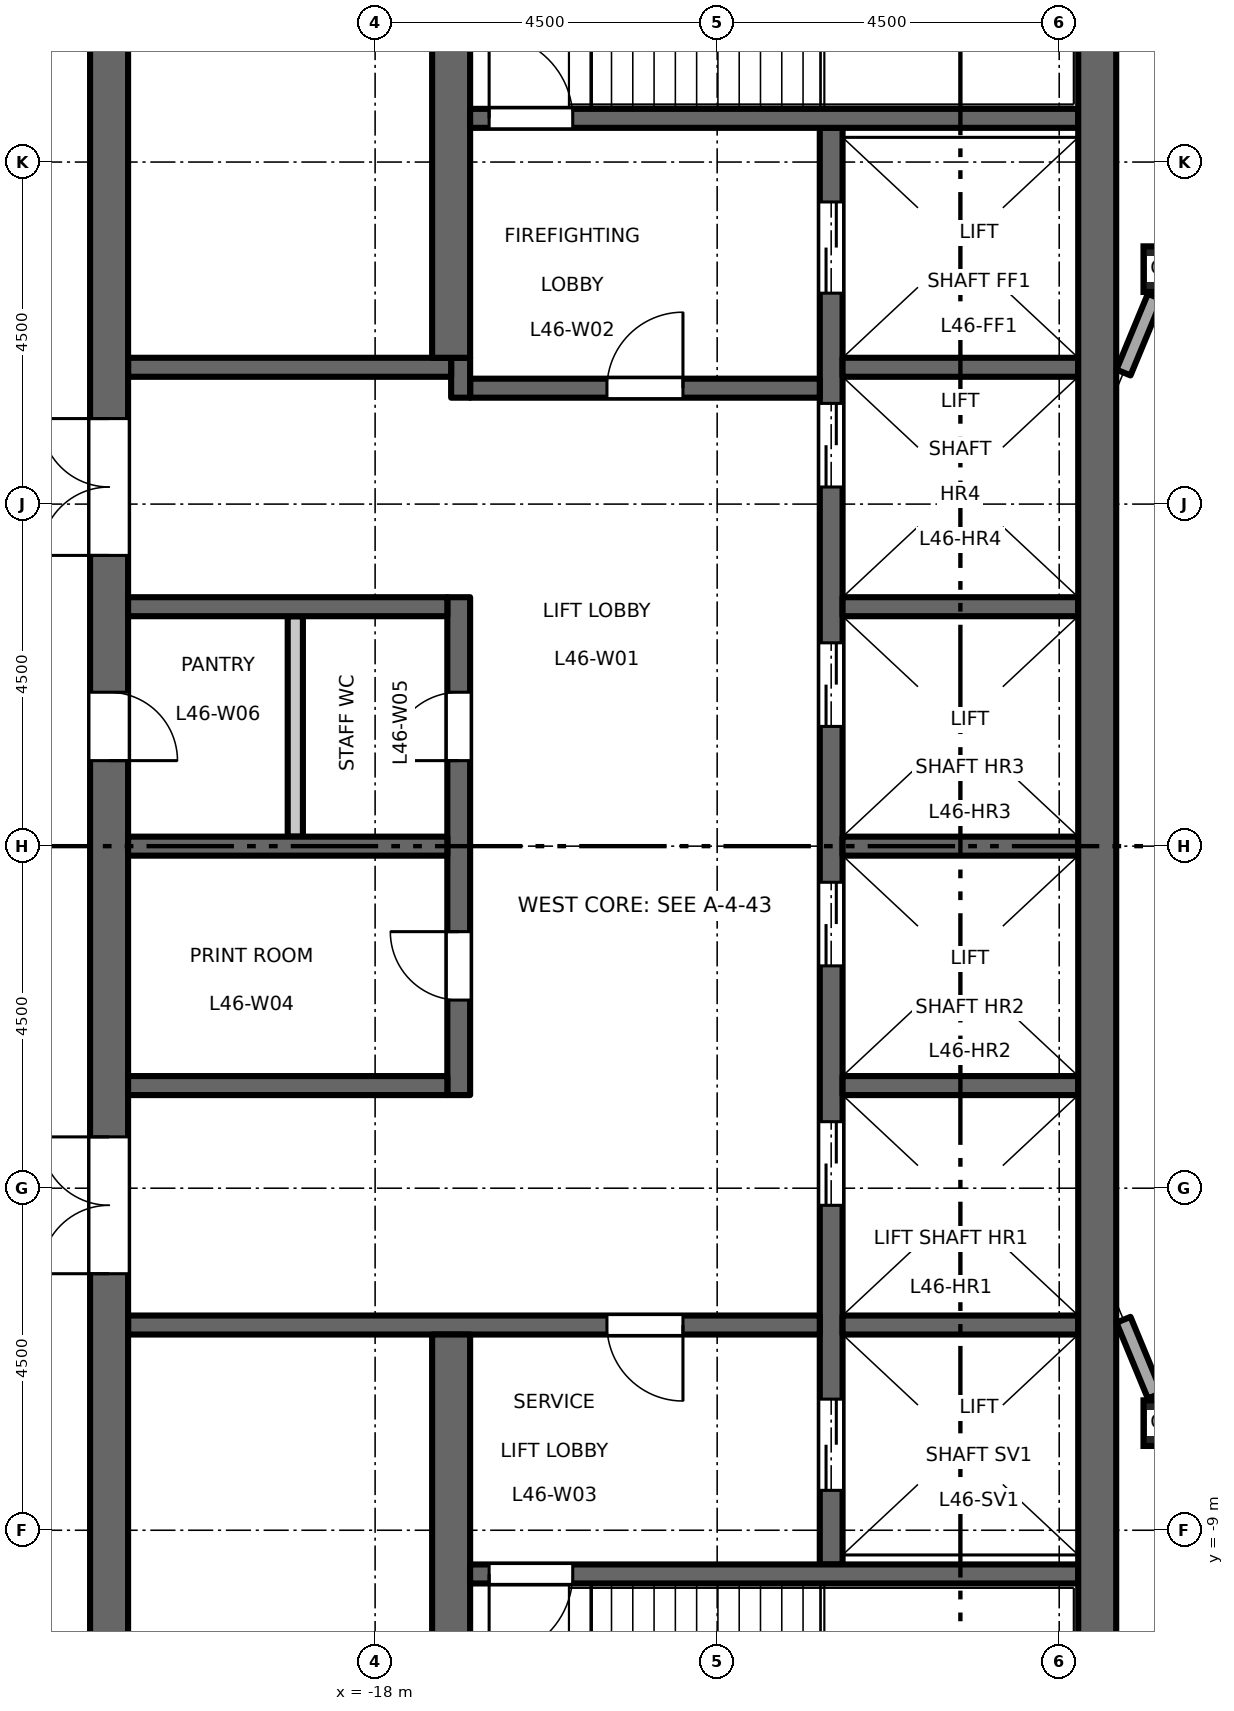
"""IFC4 building model, lengths in metres.
Left out: names, types, materials, properties, quantities, classifications, styles, units other than length and angle.
Written with IfcOpenShell. Run it as: python <this file> out.ifc"""

import sys

from ifc_helpers import new_model, si_unit, direction, frame, frame_2d, origin, origin_2d, place, context, subcontext, project, spatial, rectangle, hollow_rectangle, extrude, element, fill, save


model = new_model("IFC4")
c1 = context("Model", 3, precision=1e-05, world=origin(), true_north=direction((0.0, 1.0)))
c2 = subcontext(c1, "Body", "Model", "MODEL_VIEW")
j1 = project(units=[si_unit("LENGTHUNIT", "METRE"), si_unit("PLANEANGLEUNIT", "RADIAN")], contexts=[c1])
p1 = place(None, origin())
s1 = spatial("IfcSite", under=j1, at=p1, CompositionType="ELEMENT")
p2 = place(p1, origin())
s2 = spatial("IfcBuilding", under=s1, at=p2, CompositionType="ELEMENT")
p3 = place(p2, frame((0.0, 0.0, 215.2)))
s3 = spatial("IfcBuildingStorey", under=s2, at=p3, CompositionType="ELEMENT", Elevation=215.2)
for number, where, z_axis, x_axis in (
    (1, (-7.591, -7.591, 0.0), (0.0, 0.0, 1.0), (1.0, 0.0, 0.0)),
    (2, (-7.591, 7.591, 0.0), (0.0, 0.0, 1.0), (1.0, 0.0, 0.0)),
):
    element("IfcColumn", number, at=place(p3, frame(where, z_axis=z_axis, x_axis=x_axis)), inside=s3, PredefinedType="COLUMN", context=c2, shape_type="SweptSolid", body=[
        extrude(hollow_rectangle(XDim=0.6, YDim=0.6, WallThickness=0.032, at=origin_2d()), origin(), (0.0, 0.0, 1.0), 4.5),
    ])
p4 = place(p3, frame((-12.0, -9.45, 0.0), z_axis=(0.0, 0.0, 1.0), x_axis=(0.0, 1.0, 0.0)))
e3 = element("IfcWall", 3, at=p4, inside=s3, PredefinedType="SHEAR", context=c2, shape_type="SweptSolid", body=[
    extrude(rectangle(XDim=18.9, YDim=0.3, at=frame_2d((9.45, 0.0))), origin(), (0.0, 0.0, 1.0), 4.35),
])
p5 = place(p4, frame((4.725, 0.0, 0.0)))
e4 = element("IfcOpeningElement", 4, at=p5, cuts=e3, PredefinedType="OPENING", context=c2, shape_type="SweptSolid", body=[
    extrude(rectangle(XDim=1.1, YDim=2.1, at=frame_2d((0.55, 1.05))), frame((0.0, 0.16, 0.0), z_axis=(0.0, -1.0, 0.0), x_axis=(1.0, 0.0, 0.0)), (0.0, 0.0, 1.0), 0.32),
])
p6 = place(p4, frame((7.875, 0.0, 0.0)))
e5 = element("IfcOpeningElement", 5, at=p6, cuts=e3, PredefinedType="OPENING", context=c2, shape_type="SweptSolid", body=[
    extrude(rectangle(XDim=1.1, YDim=2.1, at=frame_2d((0.55, 1.05))), frame((0.0, 0.16, 0.0), z_axis=(0.0, -1.0, 0.0), x_axis=(1.0, 0.0, 0.0)), (0.0, 0.0, 1.0), 0.32),
])
p7 = place(p4, frame((11.025, 0.0, 0.0)))
e6 = element("IfcOpeningElement", 6, at=p7, cuts=e3, PredefinedType="OPENING", context=c2, shape_type="SweptSolid", body=[
    extrude(rectangle(XDim=1.1, YDim=2.1, at=frame_2d((0.55, 1.05))), frame((0.0, 0.16, 0.0), z_axis=(0.0, -1.0, 0.0), x_axis=(1.0, 0.0, 0.0)), (0.0, 0.0, 1.0), 0.32),
])
p8 = place(p4, frame((14.175, 0.0, 0.0)))
e7 = element("IfcOpeningElement", 7, at=p8, cuts=e3, PredefinedType="OPENING", context=c2, shape_type="SweptSolid", body=[
    extrude(rectangle(XDim=1.1, YDim=2.1, at=frame_2d((0.55, 1.05))), frame((0.0, 0.16, 0.0), z_axis=(0.0, -1.0, 0.0), x_axis=(1.0, 0.0, 0.0)), (0.0, 0.0, 1.0), 0.32),
])
p9 = place(p4, frame((16.725, 0.0, 0.0)))
e8 = element("IfcOpeningElement", 8, at=p9, cuts=e3, PredefinedType="OPENING", context=c2, shape_type="SweptSolid", body=[
    extrude(rectangle(XDim=1.2, YDim=2.1, at=frame_2d((0.6, 1.05))), frame((0.0, 0.16, 0.0), z_axis=(0.0, -1.0, 0.0), x_axis=(1.0, 0.0, 0.0)), (0.0, 0.0, 1.0), 0.32),
])
p10 = place(p4, frame((0.975, 0.0, 0.0)))
e9 = element("IfcOpeningElement", 9, at=p10, cuts=e3, PredefinedType="OPENING", context=c2, shape_type="SweptSolid", body=[
    extrude(rectangle(XDim=1.2, YDim=2.1, at=frame_2d((0.6, 1.05))), frame((0.0, 0.16, 0.0), z_axis=(0.0, -1.0, 0.0), x_axis=(1.0, 0.0, 0.0)), (0.0, 0.0, 1.0), 0.32),
])
p11 = place(p3, frame((-12.15, 6.025, 0.0), z_axis=(0.0, 0.0, 1.0), x_axis=(-1.0, 0.0, 0.0)))
e10 = element("IfcWall", 10, at=p11, inside=s3, PredefinedType="SHEAR", context=c2, shape_type="SweptSolid", body=[
    extrude(rectangle(XDim=4.6, YDim=0.25, at=frame_2d((2.3, 0.0))), origin(), (0.0, 0.0, 1.0), 4.35),
])
p12 = place(p11, frame((1.8, 0.0, 0.0)))
e11 = element("IfcOpeningElement", 11, at=p12, cuts=e10, PredefinedType="OPENING", context=c2, shape_type="SweptSolid", body=[
    extrude(rectangle(XDim=1.0, YDim=2.1, at=frame_2d((0.5, 1.05))), frame((0.0, 0.135, 0.0), z_axis=(0.0, -1.0, 0.0), x_axis=(1.0, 0.0, 0.0)), (0.0, 0.0, 1.0), 0.27),
])
p13 = place(p3, frame((-16.875, 5.9, 0.0), z_axis=(0.0, 0.0, 1.0), x_axis=(0.0, 1.0, 0.0)))
e12 = element("IfcWall", 12, at=p13, inside=s3, PredefinedType="SHEAR", context=c2, shape_type="SweptSolid", body=[
    extrude(rectangle(XDim=0.525, YDim=0.25, at=frame_2d((0.263, 0.0))), origin(), (0.0, 0.0, 1.0), 4.35),
])
p14 = place(p3, frame((-17.0, 6.3, 0.0), z_axis=(0.0, 0.0, 1.0), x_axis=(-1.0, 0.0, 0.0)))
e13 = element("IfcWall", 13, at=p14, inside=s3, PredefinedType="SHEAR", context=c2, shape_type="SweptSolid", body=[
    extrude(rectangle(XDim=4.25, YDim=0.25, at=frame_2d((2.125, 0.0))), origin(), (0.0, 0.0, 1.0), 4.35),
])
p15 = place(p3, frame((-12.15, -6.3, 0.0), z_axis=(0.0, 0.0, 1.0), x_axis=(-1.0, 0.0, 0.0)))
e14 = element("IfcWall", 14, at=p15, inside=s3, PredefinedType="SHEAR", context=c2, shape_type="SweptSolid", body=[
    extrude(rectangle(XDim=9.1, YDim=0.25, at=frame_2d((4.55, 0.0))), origin(), (0.0, 0.0, 1.0), 4.35),
])
p16 = place(p15, frame((1.8, 0.0, 0.0)))
e15 = element("IfcOpeningElement", 15, at=p16, cuts=e14, PredefinedType="OPENING", context=c2, shape_type="SweptSolid", body=[
    extrude(rectangle(XDim=1.0, YDim=2.1, at=frame_2d((0.5, 1.05))), frame((0.0, 0.135, 0.0), z_axis=(0.0, -1.0, 0.0), x_axis=(1.0, 0.0, 0.0)), (0.0, 0.0, 1.0), 0.27),
])
p17 = place(p3, frame((-21.5, -13.0, 0.0), z_axis=(0.0, 0.0, 1.0), x_axis=(0.0, 1.0, 0.0)))
e16 = element("IfcWall", 16, at=p17, inside=s3, PredefinedType="SHEAR", context=c2, shape_type="SweptSolid", body=[
    extrude(rectangle(XDim=26.0, YDim=0.5, at=frame_2d((13.0, 0.0))), origin(), (0.0, 0.0, 1.0), 4.35),
])
p18 = place(p17, frame((16.825, 0.0, 0.0)))
e17 = element("IfcOpeningElement", 17, at=p18, cuts=e16, PredefinedType="OPENING", context=c2, shape_type="SweptSolid", body=[
    extrude(rectangle(XDim=1.8, YDim=2.1, at=frame_2d((0.9, 1.05))), frame((0.0, 0.26, 0.0), z_axis=(0.0, -1.0, 0.0), x_axis=(1.0, 0.0, 0.0)), (0.0, 0.0, 1.0), 0.52),
])
p19 = place(p17, frame((7.375, 0.0, 0.0)))
e18 = element("IfcOpeningElement", 18, at=p19, cuts=e16, PredefinedType="OPENING", context=c2, shape_type="SweptSolid", body=[
    extrude(rectangle(XDim=1.8, YDim=2.1, at=frame_2d((0.9, 1.05))), frame((0.0, 0.26, 0.0), z_axis=(0.0, -1.0, 0.0), x_axis=(1.0, 0.0, 0.0)), (0.0, 0.0, 1.0), 0.52),
])
p20 = place(p17, frame((14.125, 0.0, 0.0)))
e19 = element("IfcOpeningElement", 19, at=p20, cuts=e16, PredefinedType="OPENING", context=c2, shape_type="SweptSolid", body=[
    extrude(rectangle(XDim=0.9, YDim=2.1, at=frame_2d((0.45, 1.05))), frame((0.0, 0.26, 0.0), z_axis=(0.0, -1.0, 0.0), x_axis=(1.0, 0.0, 0.0)), (0.0, 0.0, 1.0), 0.52),
])
p21 = place(p3, frame((-16.9, -3.275, 0.0), z_axis=(0.0, 0.0, 1.0), x_axis=(0.0, 1.0, 0.0)))
e20 = element("IfcWall", 20, at=p21, inside=s3, PredefinedType="SHEAR", context=c2, shape_type="SweptSolid", body=[
    extrude(rectangle(XDim=6.55, YDim=0.3, at=frame_2d((3.275, 0.0))), origin(), (0.0, 0.0, 1.0), 4.35),
])
p22 = place(p21, frame((1.25, 0.0, 0.0)))
e21 = element("IfcOpeningElement", 21, at=p22, cuts=e20, PredefinedType="OPENING", context=c2, shape_type="SweptSolid", body=[
    extrude(rectangle(XDim=0.9, YDim=2.1, at=frame_2d((0.45, 1.05))), frame((0.0, 0.16, 0.0), z_axis=(0.0, -1.0, 0.0), x_axis=(1.0, 0.0, 0.0)), (0.0, 0.0, 1.0), 0.32),
])
p23 = place(p21, frame((4.4, 0.0, 0.0)))
e22 = element("IfcOpeningElement", 22, at=p23, cuts=e20, PredefinedType="OPENING", context=c2, shape_type="SweptSolid", body=[
    extrude(rectangle(XDim=0.9, YDim=2.1, at=frame_2d((0.45, 1.05))), frame((0.0, 0.16, 0.0), z_axis=(0.0, -1.0, 0.0), x_axis=(1.0, 0.0, 0.0)), (0.0, 0.0, 1.0), 0.32),
])
for number, where, z_axis, x_axis in (
    (23, (-17.05, 0.0, 0.0), (0.0, 0.0, 1.0), (-1.0, 0.0, 0.0)),
    (24, (-17.05, 3.15, 0.0), (0.0, 0.0, 1.0), (-1.0, 0.0, 0.0)),
    (25, (-17.05, -3.15, 0.0), (0.0, 0.0, 1.0), (-1.0, 0.0, 0.0)),
):
    element("IfcWall", number, at=place(p3, frame(where, z_axis=z_axis, x_axis=x_axis)), inside=s3, PredefinedType="SHEAR", context=c2, shape_type="SweptSolid", body=[
        extrude(rectangle(XDim=4.2, YDim=0.25, at=frame_2d((2.1, 0.0))), origin(), (0.0, 0.0, 1.0), 4.35),
    ])
p24 = place(p3, frame((-19.05, 0.125, 0.0), z_axis=(0.0, 0.0, 1.0), x_axis=(0.0, 1.0, 0.0)))
e26 = element("IfcWall", 26, at=p24, inside=s3, PredefinedType="PARTITIONING", context=c2, shape_type="SweptSolid", body=[
    extrude(rectangle(XDim=2.9, YDim=0.2, at=frame_2d((1.45, 0.0))), origin(), (0.0, 0.0, 1.0), 4.35),
])
for number, where, z_axis, x_axis in (
    (27, (-17.0, 6.425, 0.0), (0.0, 0.0, 1.0), (0.0, 1.0, 0.0)),
    (28, (-17.0, -13.0, 0.0), (0.0, 0.0, 1.0), (0.0, 1.0, 0.0)),
):
    element("IfcWall", number, at=place(p3, frame(where, z_axis=z_axis, x_axis=x_axis)), inside=s3, PredefinedType="SHEAR", context=c2, shape_type="SweptSolid", body=[
        extrude(rectangle(XDim=6.575, YDim=0.5, at=frame_2d((3.288, 0.0))), origin(), (0.0, 0.0, 1.0), 4.35),
    ])
for number, where, z_axis, x_axis in (
    (29, (-8.75, 0.0, 0.0), (0.0, 0.0, 1.0), (-1.0, 0.0, 0.0)),
    (30, (-8.75, 3.15, 0.0), (0.0, 0.0, 1.0), (-1.0, 0.0, 0.0)),
    (31, (-8.75, 6.3, 0.0), (0.0, 0.0, 1.0), (-1.0, 0.0, 0.0)),
    (32, (-8.75, -3.15, 0.0), (0.0, 0.0, 1.0), (-1.0, 0.0, 0.0)),
    (33, (-8.75, -6.3, 0.0), (0.0, 0.0, 1.0), (-1.0, 0.0, 0.0)),
):
    element("IfcWall", number, at=place(p3, frame(where, z_axis=z_axis, x_axis=x_axis)), inside=s3, PredefinedType="SHEAR", context=c2, shape_type="SweptSolid", body=[
        extrude(rectangle(XDim=3.1, YDim=0.25, at=frame_2d((1.55, 0.0))), origin(), (0.0, 0.0, 1.0), 4.35),
    ])
p25 = place(p3, frame((-8.75, 9.575, 0.0), z_axis=(0.0, 0.0, 1.0), x_axis=(-1.0, 0.0, 0.0)))
e34 = element("IfcWall", 34, at=p25, inside=s3, PredefinedType="SHEAR", context=c2, shape_type="SweptSolid", body=[
    extrude(rectangle(XDim=8.0, YDim=0.25, at=frame_2d((4.0, 0.0))), origin(), (0.0, 0.0, 1.0), 4.35),
])
p26 = place(p25, frame((6.65, 0.0, 0.0)))
e35 = element("IfcOpeningElement", 35, at=p26, cuts=e34, PredefinedType="OPENING", context=c2, shape_type="SweptSolid", body=[
    extrude(rectangle(XDim=1.1, YDim=2.1, at=frame_2d((0.55, 1.05))), frame((0.0, 0.135, 0.0), z_axis=(0.0, -1.0, 0.0), x_axis=(1.0, 0.0, 0.0)), (0.0, 0.0, 1.0), 0.27),
])
p27 = place(p3, frame((-8.75, -9.575, 0.0), z_axis=(0.0, 0.0, 1.0), x_axis=(-1.0, 0.0, 0.0)))
e36 = element("IfcWall", 36, at=p27, inside=s3, PredefinedType="SHEAR", context=c2, shape_type="SweptSolid", body=[
    extrude(rectangle(XDim=8.0, YDim=0.25, at=frame_2d((4.0, 0.0))), origin(), (0.0, 0.0, 1.0), 4.35),
])
p28 = place(p27, frame((6.65, 0.0, 0.0)))
e37 = element("IfcOpeningElement", 37, at=p28, cuts=e36, PredefinedType="OPENING", context=c2, shape_type="SweptSolid", body=[
    extrude(rectangle(XDim=1.1, YDim=2.1, at=frame_2d((0.55, 1.05))), frame((0.0, 0.135, 0.0), z_axis=(0.0, -1.0, 0.0), x_axis=(1.0, 0.0, 0.0)), (0.0, 0.0, 1.0), 0.27),
])
p29 = place(p3, frame((-8.5, -13.0, 0.0), z_axis=(0.0, 0.0, 1.0), x_axis=(0.0, 1.0, 0.0)))
e38 = element("IfcWall", 38, at=p29, inside=s3, PredefinedType="SHEAR", context=c2, shape_type="SweptSolid", body=[
    extrude(rectangle(XDim=26.0, YDim=0.5, at=frame_2d((13.0, 0.0))), origin(), (0.0, 0.0, 1.0), 4.35),
])
for number, where, z_axis, x_axis in (
    (39, (-7.741, 7.229, 0.0), (0.0, 0.0, 1.0), (-0.383, -0.924, 0.0)),
    (40, (-8.154, -6.231, 0.0), (0.0, 0.0, 1.0), (0.383, -0.924, 0.0)),
):
    element("IfcWall", number, at=place(p3, frame(where, z_axis=z_axis, x_axis=x_axis)), inside=s3, PredefinedType="STANDARD", context=c2, shape_type="SweptSolid", body=[
        extrude(rectangle(XDim=1.08, YDim=0.2, at=frame_2d((0.54, 0.0))), origin(), (0.0, 0.0, 1.0), 3.918),
    ])
p30 = place(p12, origin())
e41 = element("IfcDoor", 41, at=p30, inside=s3, OperationType="SINGLE_SWING_LEFT", PredefinedType="DOOR", context=c2, shape_type="SweptSolid", body=[
    extrude(rectangle(XDim=1.0, YDim=2.1, at=frame_2d((0.5, 1.05))), frame((0.0, 0.025, 0.0), z_axis=(0.0, -1.0, 0.0), x_axis=(1.0, 0.0, 0.0)), (0.0, 0.0, 1.0), 0.05),
])
fill(e11, e41)
p31 = place(p16, origin())
e42 = element("IfcDoor", 42, at=p31, inside=s3, OperationType="SINGLE_SWING_RIGHT", PredefinedType="DOOR", context=c2, shape_type="SweptSolid", body=[
    extrude(rectangle(XDim=1.0, YDim=2.1, at=frame_2d((0.5, 1.05))), frame((0.0, 0.025, 0.0), z_axis=(0.0, -1.0, 0.0), x_axis=(1.0, 0.0, 0.0)), (0.0, 0.0, 1.0), 0.05),
])
fill(e15, e42)
p32 = place(p26, origin())
e43 = element("IfcDoor", 43, at=p32, inside=s3, OperationType="SINGLE_SWING_RIGHT", PredefinedType="DOOR", context=c2, shape_type="SweptSolid", body=[
    extrude(rectangle(XDim=1.1, YDim=2.1, at=frame_2d((0.55, 1.05))), frame((0.0, 0.025, 0.0), z_axis=(0.0, -1.0, 0.0), x_axis=(1.0, 0.0, 0.0)), (0.0, 0.0, 1.0), 0.05),
])
fill(e35, e43)
p33 = place(p28, origin())
e44 = element("IfcDoor", 44, at=p33, inside=s3, OperationType="SINGLE_SWING_LEFT", PredefinedType="DOOR", context=c2, shape_type="SweptSolid", body=[
    extrude(rectangle(XDim=1.1, YDim=2.1, at=frame_2d((0.55, 1.05))), frame((0.0, 0.025, 0.0), z_axis=(0.0, -1.0, 0.0), x_axis=(1.0, 0.0, 0.0)), (0.0, 0.0, 1.0), 0.05),
])
fill(e37, e44)
p34 = place(p18, origin())
e45 = element("IfcDoor", 45, at=p34, inside=s3, OperationType="DOUBLE_DOOR_DOUBLE_SWING", PredefinedType="DOOR", context=c2, shape_type="SweptSolid", body=[
    extrude(rectangle(XDim=1.8, YDim=2.1, at=frame_2d((0.9, 1.05))), frame((0.0, 0.025, 0.0), z_axis=(0.0, -1.0, 0.0), x_axis=(1.0, 0.0, 0.0)), (0.0, 0.0, 1.0), 0.05),
])
fill(e17, e45)
p35 = place(p19, origin())
e46 = element("IfcDoor", 46, at=p35, inside=s3, OperationType="DOUBLE_DOOR_DOUBLE_SWING", PredefinedType="DOOR", context=c2, shape_type="SweptSolid", body=[
    extrude(rectangle(XDim=1.8, YDim=2.1, at=frame_2d((0.9, 1.05))), frame((0.0, 0.025, 0.0), z_axis=(0.0, -1.0, 0.0), x_axis=(1.0, 0.0, 0.0)), (0.0, 0.0, 1.0), 0.05),
])
fill(e18, e46)
p36 = place(p5, origin())
e47 = element("IfcDoor", 47, at=p36, inside=s3, OperationType="DOUBLE_DOOR_SLIDING", PredefinedType="DOOR", context=c2, shape_type="SweptSolid", body=[
    extrude(rectangle(XDim=1.1, YDim=2.1, at=frame_2d((0.55, 1.05))), frame((0.0, 0.025, 0.0), z_axis=(0.0, -1.0, 0.0), x_axis=(1.0, 0.0, 0.0)), (0.0, 0.0, 1.0), 0.05),
])
fill(e4, e47)
p37 = place(p6, origin())
e48 = element("IfcDoor", 48, at=p37, inside=s3, OperationType="DOUBLE_DOOR_SLIDING", PredefinedType="DOOR", context=c2, shape_type="SweptSolid", body=[
    extrude(rectangle(XDim=1.1, YDim=2.1, at=frame_2d((0.55, 1.05))), frame((0.0, 0.025, 0.0), z_axis=(0.0, -1.0, 0.0), x_axis=(1.0, 0.0, 0.0)), (0.0, 0.0, 1.0), 0.05),
])
fill(e5, e48)
p38 = place(p7, origin())
e49 = element("IfcDoor", 49, at=p38, inside=s3, OperationType="DOUBLE_DOOR_SLIDING", PredefinedType="DOOR", context=c2, shape_type="SweptSolid", body=[
    extrude(rectangle(XDim=1.1, YDim=2.1, at=frame_2d((0.55, 1.05))), frame((0.0, 0.025, 0.0), z_axis=(0.0, -1.0, 0.0), x_axis=(1.0, 0.0, 0.0)), (0.0, 0.0, 1.0), 0.05),
])
fill(e6, e49)
p39 = place(p8, origin())
e50 = element("IfcDoor", 50, at=p39, inside=s3, OperationType="DOUBLE_DOOR_SLIDING", PredefinedType="DOOR", context=c2, shape_type="SweptSolid", body=[
    extrude(rectangle(XDim=1.1, YDim=2.1, at=frame_2d((0.55, 1.05))), frame((0.0, 0.025, 0.0), z_axis=(0.0, -1.0, 0.0), x_axis=(1.0, 0.0, 0.0)), (0.0, 0.0, 1.0), 0.05),
])
fill(e7, e50)
p40 = place(p9, origin())
e51 = element("IfcDoor", 51, at=p40, inside=s3, OperationType="DOUBLE_DOOR_SLIDING", PredefinedType="DOOR", context=c2, shape_type="SweptSolid", body=[
    extrude(rectangle(XDim=1.2, YDim=2.1, at=frame_2d((0.6, 1.05))), frame((0.0, 0.025, 0.0), z_axis=(0.0, -1.0, 0.0), x_axis=(1.0, 0.0, 0.0)), (0.0, 0.0, 1.0), 0.05),
])
fill(e8, e51)
p41 = place(p10, origin())
e52 = element("IfcDoor", 52, at=p41, inside=s3, OperationType="DOUBLE_DOOR_SLIDING", PredefinedType="DOOR", context=c2, shape_type="SweptSolid", body=[
    extrude(rectangle(XDim=1.2, YDim=2.1, at=frame_2d((0.6, 1.05))), frame((0.0, 0.025, 0.0), z_axis=(0.0, -1.0, 0.0), x_axis=(1.0, 0.0, 0.0)), (0.0, 0.0, 1.0), 0.05),
])
fill(e9, e52)
p42 = place(p22, origin())
e53 = element("IfcDoor", 53, at=p42, inside=s3, OperationType="SINGLE_SWING_LEFT", PredefinedType="DOOR", context=c2, shape_type="SweptSolid", body=[
    extrude(rectangle(XDim=0.9, YDim=2.1, at=frame_2d((0.45, 1.05))), frame((0.0, 0.025, 0.0), z_axis=(0.0, -1.0, 0.0), x_axis=(1.0, 0.0, 0.0)), (0.0, 0.0, 1.0), 0.05),
])
fill(e21, e53)
p43 = place(p23, origin())
e54 = element("IfcDoor", 54, at=p43, inside=s3, OperationType="SINGLE_SWING_RIGHT", PredefinedType="DOOR", context=c2, shape_type="SweptSolid", body=[
    extrude(rectangle(XDim=0.9, YDim=2.1, at=frame_2d((0.45, 1.05))), frame((0.0, 0.025, 0.0), z_axis=(0.0, -1.0, 0.0), x_axis=(1.0, 0.0, 0.0)), (0.0, 0.0, 1.0), 0.05),
])
fill(e22, e54)
p44 = place(p20, origin())
e55 = element("IfcDoor", 55, at=p44, inside=s3, OperationType="SINGLE_SWING_LEFT", PredefinedType="DOOR", context=c2, shape_type="SweptSolid", body=[
    extrude(rectangle(XDim=0.9, YDim=2.1, at=frame_2d((0.45, 1.05))), frame((0.0, 0.025, 0.0), z_axis=(0.0, -1.0, 0.0), x_axis=(1.0, 0.0, 0.0)), (0.0, 0.0, 1.0), 0.05),
])
fill(e19, e55)
save(model, sys.argv[1])
